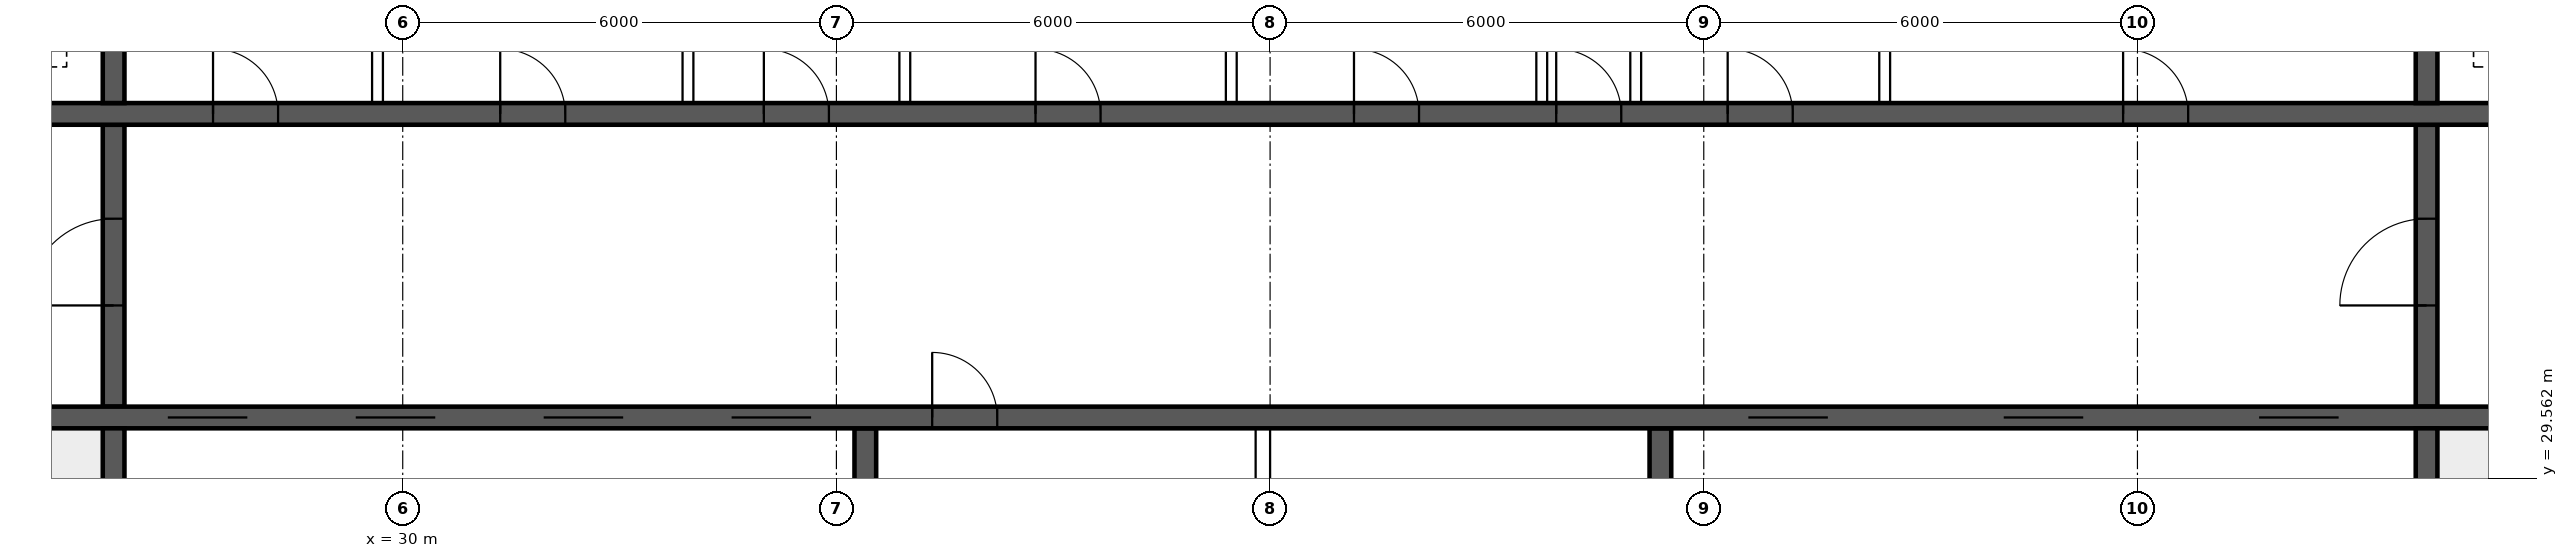
"""IFC4 building model, lengths in metres.
Left out: names, types, materials, properties, quantities, classifications, styles, units other than length and angle.
Written with IfcOpenShell. Run it as: python <this file> out.ifc"""

import sys

from ifc_helpers import new_model, si_unit, direction, frame, frame_2d, origin, place, context, subcontext, project, spatial, rectangle, extrude, element, fill, save


model = new_model("IFC4")
c1 = context("Model", 3, precision=1e-05, world=origin(), true_north=direction((0.0, 1.0)))
c2 = subcontext(c1, "Body", "Model", "MODEL_VIEW")
j1 = project(units=[si_unit("LENGTHUNIT", "METRE"), si_unit("PLANEANGLEUNIT", "RADIAN")], contexts=[c1])
p1 = place(None, origin())
s1 = spatial("IfcSite", under=j1, at=p1, CompositionType="ELEMENT")
p2 = place(p1, origin())
s2 = spatial("IfcBuilding", under=s1, at=p2, CompositionType="ELEMENT")
p3 = place(p2, frame((0.0, 0.0, 159.85)))
s3 = spatial("IfcBuildingStorey", under=s2, at=p3, CompositionType="ELEMENT", Elevation=159.85)
p4 = place(p3, frame((18.425, 30.4, 0.0), z_axis=(0.0, 0.0, 1.0), x_axis=(1.0, 0.0, 0.0)))
e1 = element("IfcWall", 1, at=p4, inside=s3, PredefinedType="SHEAR", context=c2, shape_type="SweptSolid", body=[
    extrude(rectangle(XDim=47.15, YDim=0.3, at=frame_2d((23.575, 0.0))), origin(), (0.0, 0.0, 1.0), 3.75),
])
p5 = place(p4, frame((0.4, 0.0, 0.0)))
e2 = element("IfcOpeningElement", 2, at=p5, cuts=e1, PredefinedType="OPENING", context=c2, shape_type="SweptSolid", body=[
    extrude(rectangle(XDim=1.0, YDim=2.1, at=frame_2d((0.5, 1.05))), frame((0.0, 0.16, 0.0), z_axis=(0.0, -1.0, 0.0), x_axis=(1.0, 0.0, 0.0)), (0.0, 0.0, 1.0), 0.32),
])
p6 = place(p4, frame((45.75, 0.0, 0.0)))
e3 = element("IfcOpeningElement", 3, at=p6, cuts=e1, PredefinedType="OPENING", context=c2, shape_type="SweptSolid", body=[
    extrude(rectangle(XDim=1.0, YDim=2.1, at=frame_2d((0.5, 1.05))), frame((0.0, 0.16, 0.0), z_axis=(0.0, -1.0, 0.0), x_axis=(1.0, 0.0, 0.0)), (0.0, 0.0, 1.0), 0.32),
])
p7 = place(p4, frame((8.325, 0.0, 0.0)))
e4 = element("IfcOpeningElement", 4, at=p7, cuts=e1, PredefinedType="OPENING", context=c2, shape_type="SweptSolid", body=[
    extrude(rectangle(XDim=1.1, YDim=2.1, at=frame_2d((0.55, 1.05))), frame((0.0, 0.16, 0.0), z_axis=(0.0, -1.0, 0.0), x_axis=(1.0, 0.0, 0.0)), (0.0, 0.0, 1.0), 0.32),
])
p8 = place(p4, frame((10.925, 0.0, 0.0)))
e5 = element("IfcOpeningElement", 5, at=p8, cuts=e1, PredefinedType="OPENING", context=c2, shape_type="SweptSolid", body=[
    extrude(rectangle(XDim=1.1, YDim=2.1, at=frame_2d((0.55, 1.05))), frame((0.0, 0.16, 0.0), z_axis=(0.0, -1.0, 0.0), x_axis=(1.0, 0.0, 0.0)), (0.0, 0.0, 1.0), 0.32),
])
p9 = place(p4, frame((13.525, 0.0, 0.0)))
e6 = element("IfcOpeningElement", 6, at=p9, cuts=e1, PredefinedType="OPENING", context=c2, shape_type="SweptSolid", body=[
    extrude(rectangle(XDim=1.1, YDim=2.1, at=frame_2d((0.55, 1.05))), frame((0.0, 0.16, 0.0), z_axis=(0.0, -1.0, 0.0), x_axis=(1.0, 0.0, 0.0)), (0.0, 0.0, 1.0), 0.32),
])
p10 = place(p4, frame((16.125, 0.0, 0.0)))
e7 = element("IfcOpeningElement", 7, at=p10, cuts=e1, PredefinedType="OPENING", context=c2, shape_type="SweptSolid", body=[
    extrude(rectangle(XDim=1.1, YDim=2.1, at=frame_2d((0.55, 1.05))), frame((0.0, 0.16, 0.0), z_axis=(0.0, -1.0, 0.0), x_axis=(1.0, 0.0, 0.0)), (0.0, 0.0, 1.0), 0.32),
])
p11 = place(p4, frame((18.9, 0.0, 0.0)))
e8 = element("IfcOpeningElement", 8, at=p11, cuts=e1, PredefinedType="OPENING", context=c2, shape_type="SweptSolid", body=[
    extrude(rectangle(XDim=0.9, YDim=2.1, at=frame_2d((0.45, 1.05))), frame((0.0, 0.16, 0.0), z_axis=(0.0, -1.0, 0.0), x_axis=(1.0, 0.0, 0.0)), (0.0, 0.0, 1.0), 0.32),
])
p12 = place(p4, frame((30.192, 0.0, 0.0)))
e9 = element("IfcOpeningElement", 9, at=p12, cuts=e1, PredefinedType="OPENING", context=c2, shape_type="SweptSolid", body=[
    extrude(rectangle(XDim=1.1, YDim=2.1, at=frame_2d((0.55, 1.05))), frame((0.0, 0.16, 0.0), z_axis=(0.0, -1.0, 0.0), x_axis=(1.0, 0.0, 0.0)), (0.0, 0.0, 1.0), 0.32),
])
p13 = place(p4, frame((33.725, 0.0, 0.0)))
e10 = element("IfcOpeningElement", 10, at=p13, cuts=e1, PredefinedType="OPENING", context=c2, shape_type="SweptSolid", body=[
    extrude(rectangle(XDim=1.1, YDim=2.1, at=frame_2d((0.55, 1.05))), frame((0.0, 0.16, 0.0), z_axis=(0.0, -1.0, 0.0), x_axis=(1.0, 0.0, 0.0)), (0.0, 0.0, 1.0), 0.32),
])
p14 = place(p4, frame((37.258, 0.0, 0.0)))
e11 = element("IfcOpeningElement", 11, at=p14, cuts=e1, PredefinedType="OPENING", context=c2, shape_type="SweptSolid", body=[
    extrude(rectangle(XDim=1.1, YDim=2.1, at=frame_2d((0.55, 1.05))), frame((0.0, 0.16, 0.0), z_axis=(0.0, -1.0, 0.0), x_axis=(1.0, 0.0, 0.0)), (0.0, 0.0, 1.0), 0.32),
])
p15 = place(p3, frame((18.425, 34.6, 0.0), z_axis=(0.0, 0.0, 1.0), x_axis=(1.0, 0.0, 0.0)))
e12 = element("IfcWall", 12, at=p15, inside=s3, PredefinedType="SHEAR", context=c2, shape_type="SweptSolid", body=[
    extrude(rectangle(XDim=47.15, YDim=0.3, at=frame_2d((23.575, 0.0))), origin(), (0.0, 0.0, 1.0), 3.75),
])
p16 = place(p15, frame((0.9, 0.0, 0.0)))
e13 = element("IfcOpeningElement", 13, at=p16, cuts=e12, PredefinedType="OPENING", context=c2, shape_type="SweptSolid", body=[
    extrude(rectangle(XDim=1.1, YDim=2.1, at=frame_2d((0.55, 1.05))), frame((0.0, 0.16, 0.0), z_axis=(0.0, -1.0, 0.0), x_axis=(1.0, 0.0, 0.0)), (0.0, 0.0, 1.0), 0.32),
])
p17 = place(p15, frame((45.15, 0.0, 0.0)))
e14 = element("IfcOpeningElement", 14, at=p17, cuts=e12, PredefinedType="OPENING", context=c2, shape_type="SweptSolid", body=[
    extrude(rectangle(XDim=1.1, YDim=2.1, at=frame_2d((0.55, 1.05))), frame((0.0, 0.16, 0.0), z_axis=(0.0, -1.0, 0.0), x_axis=(1.0, 0.0, 0.0)), (0.0, 0.0, 1.0), 0.32),
])
p18 = place(p15, frame((4.175, 0.0, 0.0)))
e15 = element("IfcOpeningElement", 15, at=p18, cuts=e12, PredefinedType="OPENING", context=c2, shape_type="SweptSolid", body=[
    extrude(rectangle(XDim=0.9, YDim=2.1, at=frame_2d((0.45, 1.05))), frame((0.0, 0.16, 0.0), z_axis=(0.0, -1.0, 0.0), x_axis=(1.0, 0.0, 0.0)), (0.0, 0.0, 1.0), 0.32),
])
p19 = place(p15, frame((42.075, 0.0, 0.0)))
e16 = element("IfcOpeningElement", 16, at=p19, cuts=e12, PredefinedType="OPENING", context=c2, shape_type="SweptSolid", body=[
    extrude(rectangle(XDim=0.9, YDim=2.1, at=frame_2d((0.45, 1.05))), frame((0.0, 0.16, 0.0), z_axis=(0.0, -1.0, 0.0), x_axis=(1.0, 0.0, 0.0)), (0.0, 0.0, 1.0), 0.32),
])
p20 = place(p15, frame((8.95, 0.0, 0.0)))
e17 = element("IfcOpeningElement", 17, at=p20, cuts=e12, PredefinedType="OPENING", context=c2, shape_type="SweptSolid", body=[
    extrude(rectangle(XDim=0.9, YDim=2.1, at=frame_2d((0.45, 1.05))), frame((0.0, 0.16, 0.0), z_axis=(0.0, -1.0, 0.0), x_axis=(1.0, 0.0, 0.0)), (0.0, 0.0, 1.0), 0.32),
])
p21 = place(p15, frame((12.924, 0.0, 0.0)))
e18 = element("IfcOpeningElement", 18, at=p21, cuts=e12, PredefinedType="OPENING", context=c2, shape_type="SweptSolid", body=[
    extrude(rectangle(XDim=0.9, YDim=2.1, at=frame_2d((0.45, 1.05))), frame((0.0, 0.16, 0.0), z_axis=(0.0, -1.0, 0.0), x_axis=(1.0, 0.0, 0.0)), (0.0, 0.0, 1.0), 0.32),
])
p22 = place(p15, frame((16.571, 0.0, 0.0)))
e19 = element("IfcOpeningElement", 19, at=p22, cuts=e12, PredefinedType="OPENING", context=c2, shape_type="SweptSolid", body=[
    extrude(rectangle(XDim=0.9, YDim=2.1, at=frame_2d((0.45, 1.05))), frame((0.0, 0.16, 0.0), z_axis=(0.0, -1.0, 0.0), x_axis=(1.0, 0.0, 0.0)), (0.0, 0.0, 1.0), 0.32),
])
p23 = place(p15, frame((20.33, 0.0, 0.0)))
e20 = element("IfcOpeningElement", 20, at=p23, cuts=e12, PredefinedType="OPENING", context=c2, shape_type="SweptSolid", body=[
    extrude(rectangle(XDim=0.9, YDim=2.1, at=frame_2d((0.45, 1.05))), frame((0.0, 0.16, 0.0), z_axis=(0.0, -1.0, 0.0), x_axis=(1.0, 0.0, 0.0)), (0.0, 0.0, 1.0), 0.32),
])
p24 = place(p15, frame((24.736, 0.0, 0.0)))
e21 = element("IfcOpeningElement", 21, at=p24, cuts=e12, PredefinedType="OPENING", context=c2, shape_type="SweptSolid", body=[
    extrude(rectangle(XDim=0.9, YDim=2.1, at=frame_2d((0.45, 1.05))), frame((0.0, 0.16, 0.0), z_axis=(0.0, -1.0, 0.0), x_axis=(1.0, 0.0, 0.0)), (0.0, 0.0, 1.0), 0.32),
])
p25 = place(p15, frame((27.533, 0.0, 0.0)))
e22 = element("IfcOpeningElement", 22, at=p25, cuts=e12, PredefinedType="OPENING", context=c2, shape_type="SweptSolid", body=[
    extrude(rectangle(XDim=0.9, YDim=2.1, at=frame_2d((0.45, 1.05))), frame((0.0, 0.16, 0.0), z_axis=(0.0, -1.0, 0.0), x_axis=(1.0, 0.0, 0.0)), (0.0, 0.0, 1.0), 0.32),
])
p26 = place(p15, frame((29.906, 0.0, 0.0)))
e23 = element("IfcOpeningElement", 23, at=p26, cuts=e12, PredefinedType="OPENING", context=c2, shape_type="SweptSolid", body=[
    extrude(rectangle(XDim=0.9, YDim=2.1, at=frame_2d((0.45, 1.05))), frame((0.0, 0.16, 0.0), z_axis=(0.0, -1.0, 0.0), x_axis=(1.0, 0.0, 0.0)), (0.0, 0.0, 1.0), 0.32),
])
p27 = place(p15, frame((35.376, 0.0, 0.0)))
e24 = element("IfcOpeningElement", 24, at=p27, cuts=e12, PredefinedType="OPENING", context=c2, shape_type="SweptSolid", body=[
    extrude(rectangle(XDim=0.9, YDim=2.1, at=frame_2d((0.45, 1.05))), frame((0.0, 0.16, 0.0), z_axis=(0.0, -1.0, 0.0), x_axis=(1.0, 0.0, 0.0)), (0.0, 0.0, 1.0), 0.32),
])
for number, where, z_axis, x_axis in (
    (25, (26.0, 26.225, 0.0), (0.0, 0.0, 1.0), (0.0, 1.0, 0.0)),
    (26, (58.0, 26.225, 0.0), (0.0, 0.0, 1.0), (0.0, 1.0, 0.0)),
):
    element("IfcWall", number, at=place(p3, frame(where, z_axis=z_axis, x_axis=x_axis)), inside=s3, PredefinedType="SHEAR", context=c2, shape_type="SweptSolid", body=[
        extrude(rectangle(XDim=4.025, YDim=0.3, at=frame_2d((2.012, 0.0))), origin(), (0.0, 0.0, 1.0), 3.75),
    ])
p28 = place(p3, frame((26.0, 30.55, 0.0), z_axis=(0.0, 0.0, 1.0), x_axis=(0.0, 1.0, 0.0)))
e27 = element("IfcWall", 27, at=p28, inside=s3, PredefinedType="SHEAR", context=c2, shape_type="SweptSolid", body=[
    extrude(rectangle(XDim=3.9, YDim=0.3, at=frame_2d((1.95, 0.0))), origin(), (0.0, 0.0, 1.0), 3.75),
])
p29 = place(p28, frame((1.4, 0.0, 0.0)))
e28 = element("IfcOpeningElement", 28, at=p29, cuts=e27, PredefinedType="OPENING", context=c2, shape_type="SweptSolid", body=[
    extrude(rectangle(XDim=1.2, YDim=2.1, at=frame_2d((0.6, 1.05))), frame((0.0, 0.16, 0.0), z_axis=(0.0, -1.0, 0.0), x_axis=(1.0, 0.0, 0.0)), (0.0, 0.0, 1.0), 0.32),
])
p30 = place(p3, frame((58.0, 30.55, 0.0), z_axis=(0.0, 0.0, 1.0), x_axis=(0.0, 1.0, 0.0)))
e29 = element("IfcWall", 29, at=p30, inside=s3, PredefinedType="SHEAR", context=c2, shape_type="SweptSolid", body=[
    extrude(rectangle(XDim=3.9, YDim=0.3, at=frame_2d((1.95, 0.0))), origin(), (0.0, 0.0, 1.0), 3.75),
])
p31 = place(p30, frame((1.4, 0.0, 0.0)))
e30 = element("IfcOpeningElement", 30, at=p31, cuts=e29, PredefinedType="OPENING", context=c2, shape_type="SweptSolid", body=[
    extrude(rectangle(XDim=1.2, YDim=2.1, at=frame_2d((0.6, 1.05))), frame((0.0, 0.16, 0.0), z_axis=(0.0, -1.0, 0.0), x_axis=(1.0, 0.0, 0.0)), (0.0, 0.0, 1.0), 0.32),
])
for number, where, z_axis, x_axis in (
    (31, (26.0, 34.75, 0.0), (0.0, 0.0, 1.0), (0.0, 1.0, 0.0)),
    (32, (58.0, 34.75, 0.0), (0.0, 0.0, 1.0), (0.0, 1.0, 0.0)),
):
    element("IfcWall", number, at=place(p3, frame(where, z_axis=z_axis, x_axis=x_axis)), inside=s3, PredefinedType="SHEAR", context=c2, shape_type="SweptSolid", body=[
        extrude(rectangle(XDim=3.025, YDim=0.3, at=frame_2d((1.512, 0.0))), origin(), (0.0, 0.0, 1.0), 3.75),
    ])
for number, where, z_axis, x_axis in (
    (33, (36.4, 26.225, 0.0), (0.0, 0.0, 1.0), (0.0, 1.0, 0.0)),
    (34, (47.4, 26.225, 0.0), (0.0, 0.0, 1.0), (0.0, 1.0, 0.0)),
):
    element("IfcWall", number, at=place(p3, frame(where, z_axis=z_axis, x_axis=x_axis)), inside=s3, PredefinedType="SHEAR", context=c2, shape_type="SweptSolid", body=[
        extrude(rectangle(XDim=4.025, YDim=0.3, at=frame_2d((2.012, 0.0))), origin(), (0.0, 0.0, 1.0), 3.75),
    ])
for number, where, z_axis, x_axis in (
    (35, (29.651, 34.75, 0.0), (0.0, 0.0, 1.0), (0.0, 1.0, 0.0)),
    (36, (33.946, 34.75, 0.0), (0.0, 0.0, 1.0), (0.0, 1.0, 0.0)),
    (37, (36.946, 34.75, 0.0), (0.0, 0.0, 1.0), (0.0, 1.0, 0.0)),
    (38, (41.463, 34.75, 0.0), (0.0, 0.0, 1.0), (0.0, 1.0, 0.0)),
    (39, (45.758, 34.75, 0.0), (0.0, 0.0, 1.0), (0.0, 1.0, 0.0)),
    (40, (47.058, 34.75, 0.0), (0.0, 0.0, 1.0), (0.0, 1.0, 0.0)),
    (41, (50.503, 34.75, 0.0), (0.0, 0.0, 1.0), (0.0, 1.0, 0.0)),
):
    element("IfcWall", number, at=place(p3, frame(where, z_axis=z_axis, x_axis=x_axis)), inside=s3, PredefinedType="SOLIDWALL", context=c2, shape_type="SweptSolid", body=[
        extrude(rectangle(XDim=3.025, YDim=0.15, at=frame_2d((1.512, 0.0))), origin(), (0.0, 0.0, 1.0), 3.3),
    ])
p32 = place(p3, frame((41.9, 26.225, 0.0), z_axis=(0.0, 0.0, 1.0), x_axis=(0.0, 1.0, 0.0)))
e42 = element("IfcWall", 42, at=p32, inside=s3, PredefinedType="SOLIDWALL", context=c2, shape_type="SweptSolid", body=[
    extrude(rectangle(XDim=4.025, YDim=0.2, at=frame_2d((2.012, 0.0))), origin(), (0.0, 0.0, 1.0), 3.3),
])
p33 = place(p29, origin())
e43 = element("IfcDoor", 43, at=p33, inside=s3, OperationType="SINGLE_SWING_LEFT", PredefinedType="DOOR", context=c2, shape_type="SweptSolid", body=[
    extrude(rectangle(XDim=1.2, YDim=2.1, at=frame_2d((0.6, 1.05))), frame((0.0, 0.025, 0.0), z_axis=(0.0, -1.0, 0.0), x_axis=(1.0, 0.0, 0.0)), (0.0, 0.0, 1.0), 0.05),
])
fill(e28, e43)
p34 = place(p31, origin())
e44 = element("IfcDoor", 44, at=p34, inside=s3, OperationType="SINGLE_SWING_LEFT", PredefinedType="DOOR", context=c2, shape_type="SweptSolid", body=[
    extrude(rectangle(XDim=1.2, YDim=2.1, at=frame_2d((0.6, 1.05))), frame((0.0, 0.025, 0.0), z_axis=(0.0, -1.0, 0.0), x_axis=(1.0, 0.0, 0.0)), (0.0, 0.0, 1.0), 0.05),
])
fill(e30, e44)
p35 = place(p20, origin())
e45 = element("IfcDoor", 45, at=p35, inside=s3, OperationType="SINGLE_SWING_LEFT", PredefinedType="DOOR", context=c2, shape_type="SweptSolid", body=[
    extrude(rectangle(XDim=0.9, YDim=2.1, at=frame_2d((0.45, 1.05))), frame((0.0, 0.025, 0.0), z_axis=(0.0, -1.0, 0.0), x_axis=(1.0, 0.0, 0.0)), (0.0, 0.0, 1.0), 0.05),
])
fill(e17, e45)
p36 = place(p21, origin())
e46 = element("IfcDoor", 46, at=p36, inside=s3, OperationType="SINGLE_SWING_LEFT", PredefinedType="DOOR", context=c2, shape_type="SweptSolid", body=[
    extrude(rectangle(XDim=0.9, YDim=2.1, at=frame_2d((0.45, 1.05))), frame((0.0, 0.025, 0.0), z_axis=(0.0, -1.0, 0.0), x_axis=(1.0, 0.0, 0.0)), (0.0, 0.0, 1.0), 0.05),
])
fill(e18, e46)
p37 = place(p22, origin())
e47 = element("IfcDoor", 47, at=p37, inside=s3, OperationType="SINGLE_SWING_LEFT", PredefinedType="DOOR", context=c2, shape_type="SweptSolid", body=[
    extrude(rectangle(XDim=0.9, YDim=2.1, at=frame_2d((0.45, 1.05))), frame((0.0, 0.025, 0.0), z_axis=(0.0, -1.0, 0.0), x_axis=(1.0, 0.0, 0.0)), (0.0, 0.0, 1.0), 0.05),
])
fill(e19, e47)
p38 = place(p23, origin())
e48 = element("IfcDoor", 48, at=p38, inside=s3, OperationType="SINGLE_SWING_LEFT", PredefinedType="DOOR", context=c2, shape_type="SweptSolid", body=[
    extrude(rectangle(XDim=0.9, YDim=2.1, at=frame_2d((0.45, 1.05))), frame((0.0, 0.025, 0.0), z_axis=(0.0, -1.0, 0.0), x_axis=(1.0, 0.0, 0.0)), (0.0, 0.0, 1.0), 0.05),
])
fill(e20, e48)
p39 = place(p24, origin())
e49 = element("IfcDoor", 49, at=p39, inside=s3, OperationType="SINGLE_SWING_LEFT", PredefinedType="DOOR", context=c2, shape_type="SweptSolid", body=[
    extrude(rectangle(XDim=0.9, YDim=2.1, at=frame_2d((0.45, 1.05))), frame((0.0, 0.025, 0.0), z_axis=(0.0, -1.0, 0.0), x_axis=(1.0, 0.0, 0.0)), (0.0, 0.0, 1.0), 0.05),
])
fill(e21, e49)
p40 = place(p25, origin())
e50 = element("IfcDoor", 50, at=p40, inside=s3, OperationType="SINGLE_SWING_LEFT", PredefinedType="DOOR", context=c2, shape_type="SweptSolid", body=[
    extrude(rectangle(XDim=0.9, YDim=2.1, at=frame_2d((0.45, 1.05))), frame((0.0, 0.025, 0.0), z_axis=(0.0, -1.0, 0.0), x_axis=(1.0, 0.0, 0.0)), (0.0, 0.0, 1.0), 0.05),
])
fill(e22, e50)
p41 = place(p26, origin())
e51 = element("IfcDoor", 51, at=p41, inside=s3, OperationType="SINGLE_SWING_LEFT", PredefinedType="DOOR", context=c2, shape_type="SweptSolid", body=[
    extrude(rectangle(XDim=0.9, YDim=2.1, at=frame_2d((0.45, 1.05))), frame((0.0, 0.025, 0.0), z_axis=(0.0, -1.0, 0.0), x_axis=(1.0, 0.0, 0.0)), (0.0, 0.0, 1.0), 0.05),
])
fill(e23, e51)
p42 = place(p27, origin())
e52 = element("IfcDoor", 52, at=p42, inside=s3, OperationType="SINGLE_SWING_LEFT", PredefinedType="DOOR", context=c2, shape_type="SweptSolid", body=[
    extrude(rectangle(XDim=0.9, YDim=2.1, at=frame_2d((0.45, 1.05))), frame((0.0, 0.025, 0.0), z_axis=(0.0, -1.0, 0.0), x_axis=(1.0, 0.0, 0.0)), (0.0, 0.0, 1.0), 0.05),
])
fill(e24, e52)
p43 = place(p7, origin())
e53 = element("IfcDoor", 53, at=p43, inside=s3, OperationType="DOUBLE_DOOR_SLIDING", PredefinedType="DOOR", context=c2, shape_type="SweptSolid", body=[
    extrude(rectangle(XDim=1.1, YDim=2.1, at=frame_2d((0.55, 1.05))), frame((0.0, 0.025, 0.0), z_axis=(0.0, -1.0, 0.0), x_axis=(1.0, 0.0, 0.0)), (0.0, 0.0, 1.0), 0.05),
])
fill(e4, e53)
p44 = place(p8, origin())
e54 = element("IfcDoor", 54, at=p44, inside=s3, OperationType="DOUBLE_DOOR_SLIDING", PredefinedType="DOOR", context=c2, shape_type="SweptSolid", body=[
    extrude(rectangle(XDim=1.1, YDim=2.1, at=frame_2d((0.55, 1.05))), frame((0.0, 0.025, 0.0), z_axis=(0.0, -1.0, 0.0), x_axis=(1.0, 0.0, 0.0)), (0.0, 0.0, 1.0), 0.05),
])
fill(e5, e54)
p45 = place(p9, origin())
e55 = element("IfcDoor", 55, at=p45, inside=s3, OperationType="DOUBLE_DOOR_SLIDING", PredefinedType="DOOR", context=c2, shape_type="SweptSolid", body=[
    extrude(rectangle(XDim=1.1, YDim=2.1, at=frame_2d((0.55, 1.05))), frame((0.0, 0.025, 0.0), z_axis=(0.0, -1.0, 0.0), x_axis=(1.0, 0.0, 0.0)), (0.0, 0.0, 1.0), 0.05),
])
fill(e6, e55)
p46 = place(p10, origin())
e56 = element("IfcDoor", 56, at=p46, inside=s3, OperationType="DOUBLE_DOOR_SLIDING", PredefinedType="DOOR", context=c2, shape_type="SweptSolid", body=[
    extrude(rectangle(XDim=1.1, YDim=2.1, at=frame_2d((0.55, 1.05))), frame((0.0, 0.025, 0.0), z_axis=(0.0, -1.0, 0.0), x_axis=(1.0, 0.0, 0.0)), (0.0, 0.0, 1.0), 0.05),
])
fill(e7, e56)
p47 = place(p11, origin())
e57 = element("IfcDoor", 57, at=p47, inside=s3, OperationType="SINGLE_SWING_LEFT", PredefinedType="DOOR", context=c2, shape_type="SweptSolid", body=[
    extrude(rectangle(XDim=0.9, YDim=2.1, at=frame_2d((0.45, 1.05))), frame((0.0, 0.025, 0.0), z_axis=(0.0, -1.0, 0.0), x_axis=(1.0, 0.0, 0.0)), (0.0, 0.0, 1.0), 0.05),
])
fill(e8, e57)
p48 = place(p12, origin())
e58 = element("IfcDoor", 58, at=p48, inside=s3, OperationType="DOUBLE_DOOR_SLIDING", PredefinedType="DOOR", context=c2, shape_type="SweptSolid", body=[
    extrude(rectangle(XDim=1.1, YDim=2.1, at=frame_2d((0.55, 1.05))), frame((0.0, 0.025, 0.0), z_axis=(0.0, -1.0, 0.0), x_axis=(1.0, 0.0, 0.0)), (0.0, 0.0, 1.0), 0.05),
])
fill(e9, e58)
p49 = place(p13, origin())
e59 = element("IfcDoor", 59, at=p49, inside=s3, OperationType="DOUBLE_DOOR_SLIDING", PredefinedType="DOOR", context=c2, shape_type="SweptSolid", body=[
    extrude(rectangle(XDim=1.1, YDim=2.1, at=frame_2d((0.55, 1.05))), frame((0.0, 0.025, 0.0), z_axis=(0.0, -1.0, 0.0), x_axis=(1.0, 0.0, 0.0)), (0.0, 0.0, 1.0), 0.05),
])
fill(e10, e59)
p50 = place(p14, origin())
e60 = element("IfcDoor", 60, at=p50, inside=s3, OperationType="DOUBLE_DOOR_SLIDING", PredefinedType="DOOR", context=c2, shape_type="SweptSolid", body=[
    extrude(rectangle(XDim=1.1, YDim=2.1, at=frame_2d((0.55, 1.05))), frame((0.0, 0.025, 0.0), z_axis=(0.0, -1.0, 0.0), x_axis=(1.0, 0.0, 0.0)), (0.0, 0.0, 1.0), 0.05),
])
fill(e11, e60)
save(model, sys.argv[1])
